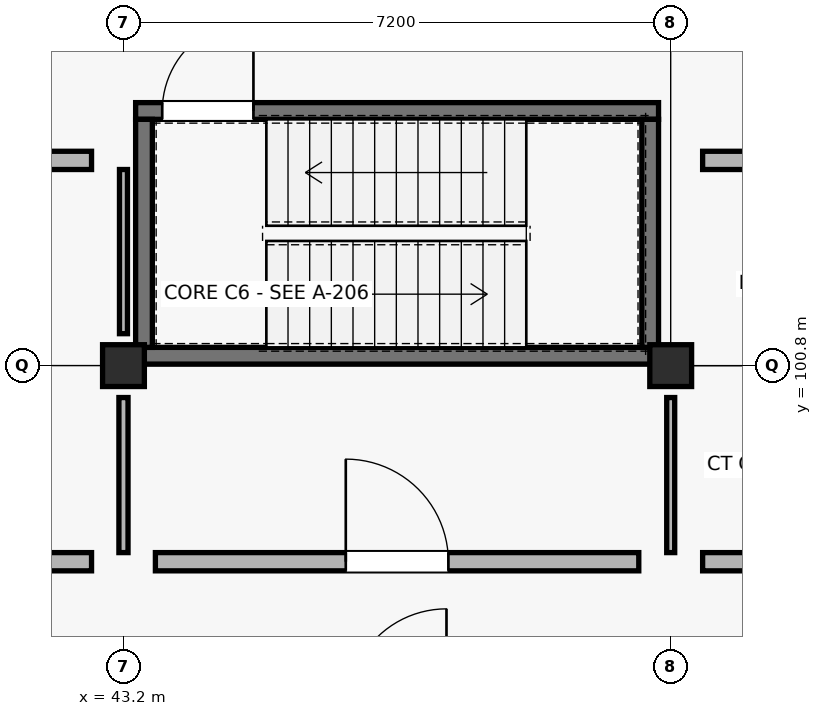
"""IFC4 building model, lengths in metres.
Left out: names, types, materials, properties, quantities, classifications, styles, units other than length and angle.
Written with IfcOpenShell. Run it as: python <this file> out.ifc"""

import sys

from ifc_helpers import new_model, si_unit, direction, frame, frame_2d, origin, origin_2d, place, context, subcontext, project, spatial, rectangle, extrude, element, fill, save


model = new_model("IFC4")
c1 = context("Model", 3, precision=1e-05, world=origin(), true_north=direction((0.0, 1.0)))
c2 = subcontext(c1, "Body", "Model", "MODEL_VIEW")
j1 = project(units=[si_unit("LENGTHUNIT", "METRE"), si_unit("PLANEANGLEUNIT", "RADIAN")], contexts=[c1])
p1 = place(None, origin())
s1 = spatial("IfcSite", under=j1, at=p1, CompositionType="ELEMENT")
p2 = place(p1, origin())
s2 = spatial("IfcBuilding", under=s1, at=p2, CompositionType="ELEMENT")
p3 = place(p2, frame((0.0, 0.0, 4.5)))
s3 = spatial("IfcBuildingStorey", under=s2, at=p3, CompositionType="ELEMENT", Elevation=4.5)
for number, where, z_axis, x_axis in (
    (1, (43.2, 100.8, 0.0), (0.0, 0.0, 1.0), (1.0, 0.0, 0.0)),
    (2, (50.4, 100.8, 0.0), (0.0, 0.0, 1.0), (1.0, 0.0, 0.0)),
):
    element("IfcColumn", number, at=place(p3, frame(where, z_axis=z_axis, x_axis=x_axis)), inside=s3, PredefinedType="COLUMN", context=c2, shape_type="SweptSolid", body=[
        extrude(rectangle(XDim=0.55, YDim=0.55, at=origin_2d()), origin(), (0.0, 0.0, 1.0), 4.5),
    ])
p4 = place(p3, frame((43.36, 100.93, 0.0), z_axis=(0.0, 0.0, 1.0), x_axis=(1.0, 0.0, 0.0)))
e3 = element("IfcWall", 3, at=p4, inside=s3, PredefinedType="SHEAR", context=c2, shape_type="SweptSolid", body=[
    extrude(rectangle(XDim=6.88, YDim=0.22, at=frame_2d((3.44, 0.0))), origin(), (0.0, 0.0, 1.0), 4.22),
])
p5 = place(p3, frame((43.36, 104.15, 0.0), z_axis=(0.0, 0.0, 1.0), x_axis=(1.0, 0.0, 0.0)))
e4 = element("IfcWall", 4, at=p5, inside=s3, PredefinedType="SHEAR", context=c2, shape_type="SweptSolid", body=[
    extrude(rectangle(XDim=6.88, YDim=0.22, at=frame_2d((3.44, 0.0))), origin(), (0.0, 0.0, 1.0), 4.22),
])
p6 = place(p5, frame((0.35, 0.0, 0.0)))
e5 = element("IfcOpeningElement", 5, at=p6, cuts=e4, PredefinedType="OPENING", context=c2, shape_type="SweptSolid", body=[
    extrude(rectangle(XDim=1.2, YDim=2.15, at=frame_2d((0.6, 1.075))), frame((0.0, 0.12, 0.0), z_axis=(0.0, -1.0, 0.0), x_axis=(1.0, 0.0, 0.0)), (0.0, 0.0, 1.0), 0.24),
])
for number, where, z_axis, x_axis in (
    (6, (43.47, 101.04, 0.0), (0.0, 0.0, 1.0), (0.0, 1.0, 0.0)),
    (7, (50.13, 101.04, 0.0), (0.0, 0.0, 1.0), (0.0, 1.0, 0.0)),
):
    element("IfcWall", number, at=place(p3, frame(where, z_axis=z_axis, x_axis=x_axis)), inside=s3, PredefinedType="SHEAR", context=c2, shape_type="SweptSolid", body=[
        extrude(rectangle(XDim=3.0, YDim=0.22, at=frame_2d((1.5, 0.0))), origin(), (0.0, 0.0, 1.0), 4.22),
    ])
p7 = place(p3, frame((36.42, 98.22, 0.0), z_axis=(0.0, 0.0, 1.0), x_axis=(1.0, 0.0, 0.0)))
e8 = element("IfcWall", 8, at=p7, inside=s3, PredefinedType="SOLIDWALL", context=c2, shape_type="SweptSolid", body=[
    extrude(rectangle(XDim=6.36, YDim=0.24, at=frame_2d((3.18, 0.0))), origin(), (0.0, 0.0, 1.0), 3.36),
])
p8 = place(p7, frame((2.505, 0.0, 0.0)))
e9 = element("IfcOpeningElement", 9, at=p8, cuts=e8, PredefinedType="OPENING", context=c2, shape_type="SweptSolid", body=[
    extrude(rectangle(XDim=1.35, YDim=2.2, at=frame_2d((0.675, 1.1))), frame((0.0, 0.13, 0.0), z_axis=(0.0, -1.0, 0.0), x_axis=(1.0, 0.0, 0.0)), (0.0, 0.0, 1.0), 0.26),
])
p9 = place(p3, frame((43.2, 98.34, 0.0), z_axis=(0.0, 0.0, 1.0), x_axis=(0.0, 1.0, 0.0)))
e10 = element("IfcWall", 10, at=p9, inside=s3, PredefinedType="PARTITIONING", context=c2, shape_type="SweptSolid", body=[
    extrude(rectangle(XDim=2.04, YDim=0.12, at=frame_2d((1.02, 0.0))), origin(), (0.0, 0.0, 1.0), 3.36),
])
p10 = place(p3, frame((36.42, 103.5, 0.0), z_axis=(0.0, 0.0, 1.0), x_axis=(1.0, 0.0, 0.0)))
e11 = element("IfcWall", 11, at=p10, inside=s3, PredefinedType="SOLIDWALL", context=c2, shape_type="SweptSolid", body=[
    extrude(rectangle(XDim=6.36, YDim=0.24, at=frame_2d((3.18, 0.0))), origin(), (0.0, 0.0, 1.0), 3.36),
])
p11 = place(p10, frame((2.53, 0.0, 0.0)))
e12 = element("IfcOpeningElement", 12, at=p11, cuts=e11, PredefinedType="OPENING", context=c2, shape_type="SweptSolid", body=[
    extrude(rectangle(XDim=1.3, YDim=2.15, at=frame_2d((0.65, 1.075))), frame((0.0, 0.13, 0.0), z_axis=(0.0, -1.0, 0.0), x_axis=(1.0, 0.0, 0.0)), (0.0, 0.0, 1.0), 0.26),
])
p12 = place(p3, frame((43.2, 101.22, 0.0), z_axis=(0.0, 0.0, 1.0), x_axis=(0.0, 1.0, 0.0)))
e13 = element("IfcWall", 13, at=p12, inside=s3, PredefinedType="PARTITIONING", context=c2, shape_type="SweptSolid", body=[
    extrude(rectangle(XDim=2.16, YDim=0.105, at=frame_2d((1.08, 0.0))), origin(), (0.0, 0.0, 1.0), 3.36),
])
p13 = place(p3, frame((43.62, 98.22, 0.0), z_axis=(0.0, 0.0, 1.0), x_axis=(1.0, 0.0, 0.0)))
e14 = element("IfcWall", 14, at=p13, inside=s3, PredefinedType="SOLIDWALL", context=c2, shape_type="SweptSolid", body=[
    extrude(rectangle(XDim=6.36, YDim=0.24, at=frame_2d((3.18, 0.0))), origin(), (0.0, 0.0, 1.0), 3.36),
])
p14 = place(p13, frame((2.505, 0.0, 0.0)))
e15 = element("IfcOpeningElement", 15, at=p14, cuts=e14, PredefinedType="OPENING", context=c2, shape_type="SweptSolid", body=[
    extrude(rectangle(XDim=1.35, YDim=2.2, at=frame_2d((0.675, 1.1))), frame((0.0, 0.13, 0.0), z_axis=(0.0, -1.0, 0.0), x_axis=(1.0, 0.0, 0.0)), (0.0, 0.0, 1.0), 0.26),
])
p15 = place(p3, frame((50.4, 98.34, 0.0), z_axis=(0.0, 0.0, 1.0), x_axis=(0.0, 1.0, 0.0)))
e16 = element("IfcWall", 16, at=p15, inside=s3, PredefinedType="PARTITIONING", context=c2, shape_type="SweptSolid", body=[
    extrude(rectangle(XDim=2.04, YDim=0.105, at=frame_2d((1.02, 0.0))), origin(), (0.0, 0.0, 1.0), 3.36),
])
p16 = place(p3, frame((50.82, 98.22, 0.0), z_axis=(0.0, 0.0, 1.0), x_axis=(1.0, 0.0, 0.0)))
e17 = element("IfcWall", 17, at=p16, inside=s3, PredefinedType="SOLIDWALL", context=c2, shape_type="SweptSolid", body=[
    extrude(rectangle(XDim=6.36, YDim=0.24, at=frame_2d((3.18, 0.0))), origin(), (0.0, 0.0, 1.0), 3.36),
])
p17 = place(p16, frame((2.505, 0.0, 0.0)))
e18 = element("IfcOpeningElement", 18, at=p17, cuts=e17, PredefinedType="OPENING", context=c2, shape_type="SweptSolid", body=[
    extrude(rectangle(XDim=1.35, YDim=2.2, at=frame_2d((0.675, 1.1))), frame((0.0, 0.13, 0.0), z_axis=(0.0, -1.0, 0.0), x_axis=(1.0, 0.0, 0.0)), (0.0, 0.0, 1.0), 0.26),
])
p18 = place(p3, frame((50.82, 103.5, 0.0), z_axis=(0.0, 0.0, 1.0), x_axis=(1.0, 0.0, 0.0)))
e19 = element("IfcWall", 19, at=p18, inside=s3, PredefinedType="SOLIDWALL", context=c2, shape_type="SweptSolid", body=[
    extrude(rectangle(XDim=6.36, YDim=0.24, at=frame_2d((3.18, 0.0))), origin(), (0.0, 0.0, 1.0), 3.36),
])
p19 = place(p18, frame((2.53, 0.0, 0.0)))
e20 = element("IfcOpeningElement", 20, at=p19, cuts=e19, PredefinedType="OPENING", context=c2, shape_type="SweptSolid", body=[
    extrude(rectangle(XDim=1.3, YDim=2.15, at=frame_2d((0.65, 1.075))), frame((0.0, 0.13, 0.0), z_axis=(0.0, -1.0, 0.0), x_axis=(1.0, 0.0, 0.0)), (0.0, 0.0, 1.0), 0.26),
])
p20 = place(p6, origin())
e21 = element("IfcDoor", 21, at=p20, inside=s3, OperationType="SINGLE_SWING_RIGHT", PredefinedType="DOOR", context=c2, shape_type="SweptSolid", body=[
    extrude(rectangle(XDim=1.2, YDim=2.15, at=frame_2d((0.6, 1.075))), frame((0.0, 0.025, 0.0), z_axis=(0.0, -1.0, 0.0), x_axis=(1.0, 0.0, 0.0)), (0.0, 0.0, 1.0), 0.05),
])
fill(e5, e21)
p21 = place(p14, origin())
e22 = element("IfcDoor", 22, at=p21, inside=s3, OperationType="SINGLE_SWING_LEFT", PredefinedType="DOOR", context=c2, shape_type="SweptSolid", body=[
    extrude(rectangle(XDim=1.35, YDim=2.2, at=frame_2d((0.675, 1.1))), frame((0.0, 0.025, 0.0), z_axis=(0.0, -1.0, 0.0), x_axis=(1.0, 0.0, 0.0)), (0.0, 0.0, 1.0), 0.05),
])
fill(e15, e22)
save(model, sys.argv[1])
